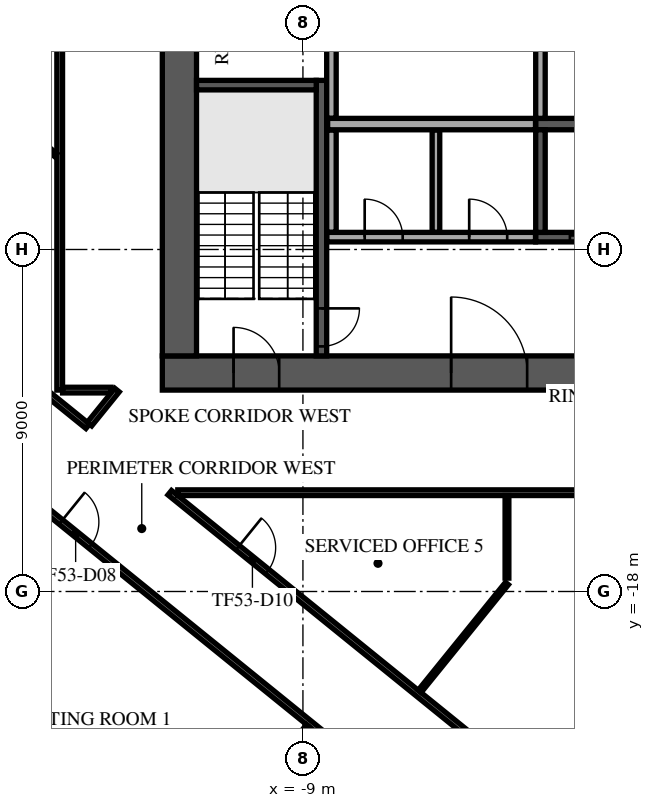
"""IFC4 building model, lengths in metres.
Left out: names, types, materials, properties, quantities, classifications, styles, units other than length and angle.
Written with IfcOpenShell. Run it as: python <this file> out.ifc"""

import sys

from ifc_helpers import new_model, si_unit, direction, frame, frame_2d, origin, place, context, subcontext, project, spatial, rectangle, extrude, element, fill, save


model = new_model("IFC4")
c1 = context("Model", 3, precision=1e-05, world=origin(), true_north=direction((0.0, 1.0)))
c2 = subcontext(c1, "Body", "Model", "MODEL_VIEW")
j1 = project(units=[si_unit("LENGTHUNIT", "METRE"), si_unit("PLANEANGLEUNIT", "RADIAN")], contexts=[c1])
p1 = place(None, origin())
s1 = spatial("IfcSite", under=j1, at=p1, CompositionType="ELEMENT")
p2 = place(p1, origin())
s2 = spatial("IfcBuilding", under=s1, at=p2, CompositionType="ELEMENT")
p3 = place(p2, frame((0.0, 0.0, 225.3)))
s3 = spatial("IfcBuildingStorey", under=s2, at=p3, CompositionType="ELEMENT", Elevation=225.3)
p4 = place(p3, frame((-12.7, -12.25, 0.0), z_axis=(0.0, 0.0, 1.0), x_axis=(1.0, 0.0, 0.0)))
e1 = element("IfcWall", 1, at=p4, inside=s3, PredefinedType="SHEAR", context=c2, shape_type="SweptSolid", body=[
    extrude(rectangle(XDim=25.4, YDim=0.9, at=frame_2d((12.7, 0.0))), origin(), (0.0, 0.0, 1.0), 3.62),
])
p5 = place(p4, frame((7.6, 0.0, 0.0)))
e2 = element("IfcOpeningElement", 2, at=p5, cuts=e1, PredefinedType="OPENING", context=c2, shape_type="SweptSolid", body=[
    extrude(rectangle(XDim=2.0, YDim=2.1, at=frame_2d((1.0, 1.05))), frame((0.0, 0.46, 0.0), z_axis=(0.0, -1.0, 0.0), x_axis=(1.0, 0.0, 0.0)), (0.0, 0.0, 1.0), 0.92),
])
p6 = place(p4, frame((17.725, 0.0, 0.0)))
e3 = element("IfcOpeningElement", 3, at=p6, cuts=e1, PredefinedType="OPENING", context=c2, shape_type="SweptSolid", body=[
    extrude(rectangle(XDim=1.2, YDim=2.1, at=frame_2d((0.6, 1.05))), frame((0.0, 0.46, 0.0), z_axis=(0.0, -1.0, 0.0), x_axis=(1.0, 0.0, 0.0)), (0.0, 0.0, 1.0), 0.92),
])
p7 = place(p4, frame((1.875, 0.0, 0.0)))
e4 = element("IfcOpeningElement", 4, at=p7, cuts=e1, PredefinedType="OPENING", context=c2, shape_type="SweptSolid", body=[
    extrude(rectangle(XDim=1.2, YDim=2.1, at=frame_2d((0.6, 1.05))), frame((0.0, 0.46, 0.0), z_axis=(0.0, -1.0, 0.0), x_axis=(1.0, 0.0, 0.0)), (0.0, 0.0, 1.0), 0.92),
])
p8 = place(p4, frame((22.325, 0.0, 0.0)))
e5 = element("IfcOpeningElement", 5, at=p8, cuts=e1, PredefinedType="OPENING", context=c2, shape_type="SweptSolid", body=[
    extrude(rectangle(XDim=1.2, YDim=2.1, at=frame_2d((0.6, 1.05))), frame((0.0, 0.46, 0.0), z_axis=(0.0, -1.0, 0.0), x_axis=(1.0, 0.0, 0.0)), (0.0, 0.0, 1.0), 0.92),
])
p9 = place(p3, frame((-12.25, -11.8, 0.0), z_axis=(0.0, 0.0, 1.0), x_axis=(0.0, 1.0, 0.0)))
e6 = element("IfcWall", 6, at=p9, inside=s3, PredefinedType="SHEAR", context=c2, shape_type="SweptSolid", body=[
    extrude(rectangle(XDim=23.6, YDim=0.9, at=frame_2d((11.8, 0.0))), origin(), (0.0, 0.0, 1.0), 3.62),
])
p10 = place(p9, frame((10.6, 0.0, 0.0)))
e7 = element("IfcOpeningElement", 7, at=p10, cuts=e6, PredefinedType="OPENING", context=c2, shape_type="SweptSolid", body=[
    extrude(rectangle(XDim=2.4, YDim=2.4, at=frame_2d((1.2, 1.2))), frame((0.0, 0.46, 0.0), z_axis=(0.0, -1.0, 0.0), x_axis=(1.0, 0.0, 0.0)), (0.0, 0.0, 1.0), 0.92),
])
p11 = place(p3, frame((-2.875, -5.7, 0.0), z_axis=(0.0, 0.0, 1.0), x_axis=(1.0, 0.0, 0.0)))
e8 = element("IfcWall", 8, at=p11, inside=s3, PredefinedType="SOLIDWALL", context=c2, shape_type="SweptSolid", body=[
    extrude(rectangle(XDim=11.25, YDim=0.3, at=frame_2d((5.625, 0.0))), origin(), (0.0, 0.0, 1.0), 3.62),
])
p12 = place(p3, frame((-2.75, -5.55, 0.0), z_axis=(0.0, 0.0, 1.0), x_axis=(0.0, 1.0, 0.0)))
e9 = element("IfcWall", 9, at=p12, inside=s3, PredefinedType="SOLIDWALL", context=c2, shape_type="SweptSolid", body=[
    extrude(rectangle(XDim=2.7, YDim=0.25, at=frame_2d((1.35, 0.0))), origin(), (0.0, 0.0, 1.0), 3.62),
])
p13 = place(p3, frame((-2.875, -8.675, 0.0), z_axis=(0.0, 0.0, 1.0), x_axis=(1.0, 0.0, 0.0)))
e10 = element("IfcWall", 10, at=p13, inside=s3, PredefinedType="SOLIDWALL", context=c2, shape_type="SweptSolid", body=[
    extrude(rectangle(XDim=11.25, YDim=0.25, at=frame_2d((5.625, 0.0))), origin(), (0.0, 0.0, 1.0), 3.62),
])
p14 = place(p13, frame((0.9, 0.0, 0.0)))
e11 = element("IfcOpeningElement", 11, at=p14, cuts=e10, PredefinedType="OPENING", context=c2, shape_type="SweptSolid", body=[
    extrude(rectangle(XDim=1.2, YDim=2.1, at=frame_2d((0.6, 1.05))), frame((0.0, 0.135, 0.0), z_axis=(0.0, -1.0, 0.0), x_axis=(1.0, 0.0, 0.0)), (0.0, 0.0, 1.0), 0.27),
])
p15 = place(p13, frame((3.65, 0.0, 0.0)))
e12 = element("IfcOpeningElement", 12, at=p15, cuts=e10, PredefinedType="OPENING", context=c2, shape_type="SweptSolid", body=[
    extrude(rectangle(XDim=1.2, YDim=2.1, at=frame_2d((0.6, 1.05))), frame((0.0, 0.135, 0.0), z_axis=(0.0, -1.0, 0.0), x_axis=(1.0, 0.0, 0.0)), (0.0, 0.0, 1.0), 0.27),
])
p16 = place(p13, frame((6.4, 0.0, 0.0)))
e13 = element("IfcOpeningElement", 13, at=p16, cuts=e10, PredefinedType="OPENING", context=c2, shape_type="SweptSolid", body=[
    extrude(rectangle(XDim=1.2, YDim=2.1, at=frame_2d((0.6, 1.05))), frame((0.0, 0.135, 0.0), z_axis=(0.0, -1.0, 0.0), x_axis=(1.0, 0.0, 0.0)), (0.0, 0.0, 1.0), 0.27),
])
p17 = place(p13, frame((9.15, 0.0, 0.0)))
e14 = element("IfcOpeningElement", 14, at=p17, cuts=e10, PredefinedType="OPENING", context=c2, shape_type="SweptSolid", body=[
    extrude(rectangle(XDim=1.2, YDim=2.1, at=frame_2d((0.6, 1.05))), frame((0.0, 0.135, 0.0), z_axis=(0.0, -1.0, 0.0), x_axis=(1.0, 0.0, 0.0)), (0.0, 0.0, 1.0), 0.27),
])
p18 = place(p3, frame((-2.75, -8.55, 0.0), z_axis=(0.0, 0.0, 1.0), x_axis=(0.0, 1.0, 0.0)))
e15 = element("IfcWall", 15, at=p18, inside=s3, PredefinedType="SOLIDWALL", context=c2, shape_type="SweptSolid", body=[
    extrude(rectangle(XDim=2.7, YDim=0.25, at=frame_2d((1.35, 0.0))), origin(), (0.0, 0.0, 1.0), 3.62),
])
p19 = place(p3, frame((-8.512, -4.55, 0.0), z_axis=(0.0, 0.0, 1.0), x_axis=(0.0, -1.0, 0.0)))
e16 = element("IfcWall", 16, at=p19, inside=s3, PredefinedType="SOLIDWALL", context=c2, shape_type="SweptSolid", body=[
    extrude(rectangle(XDim=7.25, YDim=0.275, at=frame_2d((3.625, 0.0))), origin(), (0.0, 0.0, 1.0), 3.62),
])
p20 = place(p19, frame((6.0, 0.0, 0.0)))
e17 = element("IfcOpeningElement", 17, at=p20, cuts=e16, PredefinedType="OPENING", context=c2, shape_type="SweptSolid", body=[
    extrude(rectangle(XDim=1.0, YDim=2.1, at=frame_2d((0.5, 1.05))), frame((0.0, 0.147, 0.0), z_axis=(0.0, -1.0, 0.0), x_axis=(1.0, 0.0, 0.0)), (0.0, 0.0, 1.0), 0.295),
])
p21 = place(p3, frame((-8.65, -4.675, 0.0), z_axis=(0.0, 0.0, 1.0), x_axis=(-1.0, 0.0, 0.0)))
e18 = element("IfcWall", 18, at=p21, inside=s3, PredefinedType="SOLIDWALL", context=c2, shape_type="SweptSolid", body=[
    extrude(rectangle(XDim=3.15, YDim=0.25, at=frame_2d((1.575, 0.0))), origin(), (0.0, 0.0, 1.0), 3.62),
])
p22 = place(p3, frame((-8.37, -8.675, 0.0), z_axis=(0.0, 0.0, 1.0), x_axis=(1.0, 0.0, 0.0)))
e19 = element("IfcWall", 19, at=p22, inside=s3, PredefinedType="PARTITIONING", context=c2, shape_type="SweptSolid", body=[
    extrude(rectangle(XDim=5.49, YDim=0.25, at=frame_2d((2.745, 0.0))), origin(), (0.0, 0.0, 1.0), 3.62),
])
p23 = place(p22, frame((0.995, 0.0, 0.0)))
e20 = element("IfcOpeningElement", 20, at=p23, cuts=e19, PredefinedType="OPENING", context=c2, shape_type="SweptSolid", body=[
    extrude(rectangle(XDim=1.0, YDim=2.1, at=frame_2d((0.5, 1.05))), frame((0.0, 0.135, 0.0), z_axis=(0.0, -1.0, 0.0), x_axis=(1.0, 0.0, 0.0)), (0.0, 0.0, 1.0), 0.27),
])
p24 = place(p22, frame((3.745, 0.0, 0.0)))
e21 = element("IfcOpeningElement", 21, at=p24, cuts=e19, PredefinedType="OPENING", context=c2, shape_type="SweptSolid", body=[
    extrude(rectangle(XDim=1.0, YDim=2.1, at=frame_2d((0.5, 1.05))), frame((0.0, 0.135, 0.0), z_axis=(0.0, -1.0, 0.0), x_axis=(1.0, 0.0, 0.0)), (0.0, 0.0, 1.0), 0.27),
])
p25 = place(p3, frame((-8.25, -8.545, 0.0), z_axis=(0.0, 0.0, 1.0), x_axis=(0.0, 1.0, 0.0)))
e22 = element("IfcWall", 22, at=p25, inside=s3, PredefinedType="PARTITIONING", context=c2, shape_type="SweptSolid", body=[
    extrude(rectangle(XDim=2.69, YDim=0.25, at=frame_2d((1.345, 0.0))), origin(), (0.0, 0.0, 1.0), 3.62),
])
p26 = place(p3, frame((-5.5, -8.545, 0.0), z_axis=(0.0, 0.0, 1.0), x_axis=(0.0, 1.0, 0.0)))
e23 = element("IfcWall", 23, at=p26, inside=s3, PredefinedType="PARTITIONING", context=c2, shape_type="SweptSolid", body=[
    extrude(rectangle(XDim=2.69, YDim=0.2, at=frame_2d((1.345, 0.0))), origin(), (0.0, 0.0, 1.0), 3.62),
])
p27 = place(p3, frame((-8.35, -5.7, 0.0), z_axis=(0.0, 0.0, 1.0), x_axis=(1.0, 0.0, 0.0)))
e24 = element("IfcWall", 24, at=p27, inside=s3, PredefinedType="PARTITIONING", context=c2, shape_type="SweptSolid", body=[
    extrude(rectangle(XDim=5.47, YDim=0.3, at=frame_2d((2.735, 0.0))), origin(), (0.0, 0.0, 1.0), 3.62),
])
p28 = place(p3, frame((-8.25, -5.545, 0.0), z_axis=(0.0, 0.0, 1.0), x_axis=(0.0, 1.0, 0.0)))
e25 = element("IfcWall", 25, at=p28, inside=s3, PredefinedType="PARTITIONING", context=c2, shape_type="SweptSolid", body=[
    extrude(rectangle(XDim=2.69, YDim=0.25, at=frame_2d((1.345, 0.0))), origin(), (0.0, 0.0, 1.0), 3.62),
])
p29 = place(p3, frame((-33.845, -10.81, 0.0), z_axis=(0.0, 0.0, 1.0), x_axis=(0.777145437972, -0.629321037499, 0.0)))
e26 = element("IfcWall", 26, at=p29, inside=s3, PredefinedType="STANDARD", context=c2, shape_type="SweptSolid", body=[
    extrude(rectangle(XDim=39.0, YDim=0.6, at=frame_2d((19.5, 0.0))), origin(), (0.0, 0.0, 1.0), 3.62),
])
p30 = place(p29, frame((1.217, 0.0, 0.9)))
e27 = element("IfcOpeningElement", 27, at=p30, cuts=e26, PredefinedType="OPENING", context=c2, shape_type="SweptSolid", body=[
    extrude(rectangle(XDim=1.9, YDim=2.1, at=frame_2d((0.95, 1.05))), frame((0.0, 0.31, 0.0), z_axis=(0.0, -1.0, 0.0), x_axis=(1.0, 0.0, 0.0)), (0.0, 0.0, 1.0), 0.62),
])
p31 = place(p29, frame((5.55, 0.0, 0.9)))
e28 = element("IfcOpeningElement", 28, at=p31, cuts=e26, PredefinedType="OPENING", context=c2, shape_type="SweptSolid", body=[
    extrude(rectangle(XDim=1.9, YDim=2.1, at=frame_2d((0.95, 1.05))), frame((0.0, 0.31, 0.0), z_axis=(0.0, -1.0, 0.0), x_axis=(1.0, 0.0, 0.0)), (0.0, 0.0, 1.0), 0.62),
])
p32 = place(p29, frame((9.883, 0.0, 0.9)))
e29 = element("IfcOpeningElement", 29, at=p32, cuts=e26, PredefinedType="OPENING", context=c2, shape_type="SweptSolid", body=[
    extrude(rectangle(XDim=1.9, YDim=2.1, at=frame_2d((0.95, 1.05))), frame((0.0, 0.31, 0.0), z_axis=(0.0, -1.0, 0.0), x_axis=(1.0, 0.0, 0.0)), (0.0, 0.0, 1.0), 0.62),
])
p33 = place(p29, frame((14.217, 0.0, 0.9)))
e30 = element("IfcOpeningElement", 30, at=p33, cuts=e26, PredefinedType="OPENING", context=c2, shape_type="SweptSolid", body=[
    extrude(rectangle(XDim=1.9, YDim=2.1, at=frame_2d((0.95, 1.05))), frame((0.0, 0.31, 0.0), z_axis=(0.0, -1.0, 0.0), x_axis=(1.0, 0.0, 0.0)), (0.0, 0.0, 1.0), 0.62),
])
p34 = place(p29, frame((18.55, 0.0, 0.9)))
e31 = element("IfcOpeningElement", 31, at=p34, cuts=e26, PredefinedType="OPENING", context=c2, shape_type="SweptSolid", body=[
    extrude(rectangle(XDim=1.9, YDim=2.1, at=frame_2d((0.95, 1.05))), frame((0.0, 0.31, 0.0), z_axis=(0.0, -1.0, 0.0), x_axis=(1.0, 0.0, 0.0)), (0.0, 0.0, 1.0), 0.62),
])
p35 = place(p29, frame((22.883, 0.0, 0.9)))
e32 = element("IfcOpeningElement", 32, at=p35, cuts=e26, PredefinedType="OPENING", context=c2, shape_type="SweptSolid", body=[
    extrude(rectangle(XDim=1.9, YDim=2.1, at=frame_2d((0.95, 1.05))), frame((0.0, 0.31, 0.0), z_axis=(0.0, -1.0, 0.0), x_axis=(1.0, 0.0, 0.0)), (0.0, 0.0, 1.0), 0.62),
])
p36 = place(p29, frame((27.217, 0.0, 0.9)))
e33 = element("IfcOpeningElement", 33, at=p36, cuts=e26, PredefinedType="OPENING", context=c2, shape_type="SweptSolid", body=[
    extrude(rectangle(XDim=1.9, YDim=2.1, at=frame_2d((0.95, 1.05))), frame((0.0, 0.31, 0.0), z_axis=(0.0, -1.0, 0.0), x_axis=(1.0, 0.0, 0.0)), (0.0, 0.0, 1.0), 0.62),
])
p37 = place(p29, frame((31.55, 0.0, 0.9)))
e34 = element("IfcOpeningElement", 34, at=p37, cuts=e26, PredefinedType="OPENING", context=c2, shape_type="SweptSolid", body=[
    extrude(rectangle(XDim=1.9, YDim=2.1, at=frame_2d((0.95, 1.05))), frame((0.0, 0.31, 0.0), z_axis=(0.0, -1.0, 0.0), x_axis=(1.0, 0.0, 0.0)), (0.0, 0.0, 1.0), 0.62),
])
p38 = place(p29, frame((35.883, 0.0, 0.9)))
e35 = element("IfcOpeningElement", 35, at=p38, cuts=e26, PredefinedType="OPENING", context=c2, shape_type="SweptSolid", body=[
    extrude(rectangle(XDim=1.9, YDim=2.1, at=frame_2d((0.95, 1.05))), frame((0.0, 0.31, 0.0), z_axis=(0.0, -1.0, 0.0), x_axis=(1.0, 0.0, 0.0)), (0.0, 0.0, 1.0), 0.62),
])
p39 = place(p3, frame((-24.857, -3.939, 0.0), z_axis=(0.0, 0.0, 1.0), x_axis=(0.629334227899, 0.777134756393, 0.0)))
e36 = element("IfcWall", 36, at=p39, inside=s3, PredefinedType="PARTITIONING", context=c2, shape_type="SweptSolid", body=[
    extrude(rectangle(XDim=15.027, YDim=0.15, at=frame_2d((7.513, 0.0))), origin(), (0.0, 0.0, 1.0), 3.17),
])
p40 = place(p3, frame((-24.374, -8.878, 0.0), z_axis=(0.0, 0.0, 1.0), x_axis=(0.777132572121, -0.629336925143, 0.0)))
e37 = element("IfcWall", 37, at=p40, inside=s3, PredefinedType="PARTITIONING", context=c2, shape_type="SweptSolid", body=[
    extrude(rectangle(XDim=26.785, YDim=0.15, at=frame_2d((13.393, 0.0))), origin(), (0.0, 0.0, 1.0), 3.17),
])
p41 = place(p40, frame((1.3, 0.0, 0.0)))
e38 = element("IfcOpeningElement", 38, at=p41, cuts=e37, PredefinedType="OPENING", context=c2, shape_type="SweptSolid", body=[
    extrude(rectangle(XDim=1.0, YDim=2.1, at=frame_2d((0.5, 1.05))), frame((0.0, 0.085, 0.0), z_axis=(0.0, -1.0, 0.0), x_axis=(1.0, 0.0, 0.0)), (0.0, 0.0, 1.0), 0.17),
])
p42 = place(p40, frame((5.461, 0.0, 0.0)))
e39 = element("IfcOpeningElement", 39, at=p42, cuts=e37, PredefinedType="OPENING", context=c2, shape_type="SweptSolid", body=[
    extrude(rectangle(XDim=1.0, YDim=2.1, at=frame_2d((0.5, 1.05))), frame((0.0, 0.085, 0.0), z_axis=(0.0, -1.0, 0.0), x_axis=(1.0, 0.0, 0.0)), (0.0, 0.0, 1.0), 0.17),
])
p43 = place(p40, frame((11.587, 0.0, 0.0)))
e40 = element("IfcOpeningElement", 40, at=p43, cuts=e37, PredefinedType="OPENING", context=c2, shape_type="SweptSolid", body=[
    extrude(rectangle(XDim=1.0, YDim=2.1, at=frame_2d((0.5, 1.05))), frame((0.0, 0.085, 0.0), z_axis=(0.0, -1.0, 0.0), x_axis=(1.0, 0.0, 0.0)), (0.0, 0.0, 1.0), 0.17),
])
p44 = place(p3, frame((-22.922, -6.965, 0.0), z_axis=(0.0, 0.0, 1.0), x_axis=(0.777148029431, -0.629317837306, 0.0)))
e41 = element("IfcWall", 41, at=p44, inside=s3, PredefinedType="PARTITIONING", context=c2, shape_type="SweptSolid", body=[
    extrude(rectangle(XDim=10.627, YDim=0.15, at=frame_2d((5.314, 0.0))), origin(), (0.0, 0.0, 1.0), 3.17),
])
p45 = place(p3, frame((-15.4, -12.7, 0.0), z_axis=(0.0, 0.0, 1.0), x_axis=(0.0, 1.0, 0.0)))
e42 = element("IfcWall", 42, at=p45, inside=s3, PredefinedType="PARTITIONING", context=c2, shape_type="SweptSolid", body=[
    extrude(rectangle(XDim=20.227, YDim=0.15, at=frame_2d((10.114, 0.0))), origin(), (0.0, 0.0, 1.0), 3.17),
])
p46 = place(p45, frame((10.4, 0.0, 0.0)))
e43 = element("IfcOpeningElement", 43, at=p46, cuts=e42, PredefinedType="OPENING", context=c2, shape_type="SweptSolid", body=[
    extrude(rectangle(XDim=1.0, YDim=2.1, at=frame_2d((0.5, 1.05))), frame((0.0, 0.085, 0.0), z_axis=(0.0, -1.0, 0.0), x_axis=(1.0, 0.0, 0.0)), (0.0, 0.0, 1.0), 0.17),
])
p47 = place(p45, frame((15.784, 0.0, 0.0)))
e44 = element("IfcOpeningElement", 44, at=p47, cuts=e42, PredefinedType="OPENING", context=c2, shape_type="SweptSolid", body=[
    extrude(rectangle(XDim=1.0, YDim=2.1, at=frame_2d((0.5, 1.05))), frame((0.0, 0.085, 0.0), z_axis=(0.0, -1.0, 0.0), x_axis=(1.0, 0.0, 0.0)), (0.0, 0.0, 1.0), 0.17),
])
p48 = place(p3, frame((-15.325, -12.7, 0.0), z_axis=(0.0, 0.0, 1.0), x_axis=(1.0, 0.0, 0.0)))
e45 = element("IfcWall", 45, at=p48, inside=s3, PredefinedType="PARTITIONING", context=c2, shape_type="SweptSolid", body=[
    extrude(rectangle(XDim=1.277, YDim=0.15, at=frame_2d((0.638, 0.0))), origin(), (0.0, 0.0, 1.0), 3.17),
])
p49 = place(p3, frame((-14.616, -13.595, 0.0), z_axis=(0.0, 0.0, 1.0), x_axis=(0.629338514223, 0.777131285251, 0.0)))
e46 = element("IfcWall", 46, at=p49, inside=s3, PredefinedType="PARTITIONING", context=c2, shape_type="SweptSolid", body=[
    extrude(rectangle(XDim=1.151, YDim=0.15, at=frame_2d((0.576, 0.0))), origin(), (0.0, 0.0, 1.0), 3.17),
])
p50 = place(p3, frame((-12.505, -15.4, 0.0), z_axis=(0.0, 0.0, 1.0), x_axis=(0.77712909422, -0.629341219783, 0.0)))
e47 = element("IfcWall", 47, at=p50, inside=s3, PredefinedType="PARTITIONING", context=c2, shape_type="SweptSolid", body=[
    extrude(rectangle(XDim=13.457, YDim=0.15, at=frame_2d((6.729, 0.0))), origin(), (0.0, 0.0, 1.0), 3.17),
])
p51 = place(p50, frame((2.3, 0.0, 0.0)))
e48 = element("IfcOpeningElement", 48, at=p51, cuts=e47, PredefinedType="OPENING", context=c2, shape_type="SweptSolid", body=[
    extrude(rectangle(XDim=1.0, YDim=2.1, at=frame_2d((0.5, 1.05))), frame((0.0, 0.085, 0.0), z_axis=(0.0, -1.0, 0.0), x_axis=(1.0, 0.0, 0.0)), (0.0, 0.0, 1.0), 0.17),
])
p52 = place(p3, frame((-12.293, -15.4, 0.0), z_axis=(0.0, 0.0, 1.0), x_axis=(1.0, 0.0, 0.0)))
e49 = element("IfcWall", 49, at=p52, inside=s3, PredefinedType="PARTITIONING", context=c2, shape_type="SweptSolid", body=[
    extrude(rectangle(XDim=21.489, YDim=0.15, at=frame_2d((10.745, 0.0))), origin(), (0.0, 0.0, 1.0), 3.17),
])
p53 = place(p52, frame((13.212, 0.0, 0.0)))
e50 = element("IfcOpeningElement", 50, at=p53, cuts=e49, PredefinedType="OPENING", context=c2, shape_type="SweptSolid", body=[
    extrude(rectangle(XDim=1.8, YDim=2.1, at=frame_2d((0.9, 1.05))), frame((0.0, 0.085, 0.0), z_axis=(0.0, -1.0, 0.0), x_axis=(1.0, 0.0, 0.0)), (0.0, 0.0, 1.0), 0.17),
])
p54 = place(p3, frame((-22.355, -0.968, 0.0), z_axis=(0.0, 0.0, 1.0), x_axis=(0.777138402267, -0.629329725757, 0.0)))
e51 = element("IfcWall", 51, at=p54, inside=s3, PredefinedType="PARTITIONING", context=c2, shape_type="SweptSolid", body=[
    extrude(rectangle(XDim=8.812, YDim=0.1, at=frame_2d((4.406, 0.0))), origin(), (0.0, 0.0, 1.0), 3.17),
])
p55 = place(p3, frame((-13.439, -26.945, 0.0), z_axis=(0.0, 0.0, 1.0), x_axis=(0.645645597662, 0.763637192795, 0.0)))
e52 = element("IfcWall", 52, at=p55, inside=s3, PredefinedType="PARTITIONING", context=c2, shape_type="SweptSolid", body=[
    extrude(rectangle(XDim=7.085, YDim=0.1, at=frame_2d((3.542, 0.0))), origin(), (0.0, 0.0, 1.0), 2.97),
])
p56 = place(p3, frame((-5.93, -20.629, 0.0), z_axis=(0.0, 0.0, 1.0), x_axis=(0.629175159383, 0.777263545277, 0.0)))
e53 = element("IfcWall", 53, at=p56, inside=s3, PredefinedType="PARTITIONING", context=c2, shape_type="SweptSolid", body=[
    extrude(rectangle(XDim=3.653, YDim=0.1, at=frame_2d((1.827, 0.0))), origin(), (0.0, 0.0, 1.0), 3.17),
])
p57 = place(p3, frame((-3.631, -17.648, 0.0), z_axis=(0.0, 0.0, 1.0), x_axis=(0.0, 1.0, 0.0)))
e54 = element("IfcWall", 54, at=p57, inside=s3, PredefinedType="PARTITIONING", context=c2, shape_type="SweptSolid", body=[
    extrude(rectangle(XDim=2.173, YDim=0.1, at=frame_2d((1.086, 0.0))), origin(), (0.0, 0.0, 1.0), 3.62),
])
p58 = place(p5, origin())
e55 = element("IfcDoor", 55, at=p58, inside=s3, OperationType="SINGLE_SWING_LEFT", PredefinedType="DOOR", context=c2, shape_type="SweptSolid", body=[
    extrude(rectangle(XDim=2.0, YDim=2.1, at=frame_2d((1.0, 1.05))), frame((0.0, 0.025, 0.0), z_axis=(0.0, -1.0, 0.0), x_axis=(1.0, 0.0, 0.0)), (0.0, 0.0, 1.0), 0.05),
])
fill(e2, e55)
p59 = place(p7, origin())
e56 = element("IfcDoor", 56, at=p59, inside=s3, OperationType="SINGLE_SWING_LEFT", PredefinedType="DOOR", context=c2, shape_type="SweptSolid", body=[
    extrude(rectangle(XDim=1.2, YDim=2.1, at=frame_2d((0.6, 1.05))), frame((0.0, 0.025, 0.0), z_axis=(0.0, -1.0, 0.0), x_axis=(1.0, 0.0, 0.0)), (0.0, 0.0, 1.0), 0.05),
])
fill(e4, e56)
p60 = place(p14, origin())
e57 = element("IfcDoor", 57, at=p60, inside=s3, OperationType="DOUBLE_DOOR_SLIDING", PredefinedType="DOOR", context=c2, shape_type="SweptSolid", body=[
    extrude(rectangle(XDim=1.2, YDim=2.1, at=frame_2d((0.6, 1.05))), frame((0.0, 0.025, 0.0), z_axis=(0.0, -1.0, 0.0), x_axis=(1.0, 0.0, 0.0)), (0.0, 0.0, 1.0), 0.05),
])
fill(e11, e57)
p61 = place(p20, origin())
e58 = element("IfcDoor", 58, at=p61, inside=s3, OperationType="SINGLE_SWING_LEFT", PredefinedType="DOOR", context=c2, shape_type="SweptSolid", body=[
    extrude(rectangle(XDim=1.0, YDim=2.1, at=frame_2d((0.5, 1.05))), frame((0.0, 0.025, 0.0), z_axis=(0.0, -1.0, 0.0), x_axis=(1.0, 0.0, 0.0)), (0.0, 0.0, 1.0), 0.05),
])
fill(e17, e58)
p62 = place(p23, origin())
e59 = element("IfcDoor", 59, at=p62, inside=s3, OperationType="SINGLE_SWING_RIGHT", PredefinedType="DOOR", context=c2, shape_type="SweptSolid", body=[
    extrude(rectangle(XDim=1.0, YDim=2.1, at=frame_2d((0.5, 1.05))), frame((0.0, 0.025, 0.0), z_axis=(0.0, -1.0, 0.0), x_axis=(1.0, 0.0, 0.0)), (0.0, 0.0, 1.0), 0.05),
])
fill(e20, e59)
p63 = place(p24, origin())
e60 = element("IfcDoor", 60, at=p63, inside=s3, OperationType="SINGLE_SWING_RIGHT", PredefinedType="DOOR", context=c2, shape_type="SweptSolid", body=[
    extrude(rectangle(XDim=1.0, YDim=2.1, at=frame_2d((0.5, 1.05))), frame((0.0, 0.025, 0.0), z_axis=(0.0, -1.0, 0.0), x_axis=(1.0, 0.0, 0.0)), (0.0, 0.0, 1.0), 0.05),
])
fill(e21, e60)
p64 = place(p43, frame((1.0, 0.0, 0.0), z_axis=(0.0, 0.0, 1.0), x_axis=(-1.0, 0.0, 0.0)))
e61 = element("IfcDoor", 61, at=p64, inside=s3, OperationType="SINGLE_SWING_RIGHT", PredefinedType="DOOR", context=c2, shape_type="SweptSolid", body=[
    extrude(rectangle(XDim=1.0, YDim=2.1, at=frame_2d((0.5, 1.05))), frame((0.0, 0.025, 0.0), z_axis=(0.0, -1.0, 0.0), x_axis=(1.0, 0.0, 0.0)), (0.0, 0.0, 1.0), 0.05),
])
fill(e40, e61)
p65 = place(p51, origin())
e62 = element("IfcDoor", 62, at=p65, inside=s3, OperationType="SINGLE_SWING_RIGHT", PredefinedType="DOOR", context=c2, shape_type="SweptSolid", body=[
    extrude(rectangle(XDim=1.0, YDim=2.1, at=frame_2d((0.5, 1.05))), frame((0.0, 0.025, 0.0), z_axis=(0.0, -1.0, 0.0), x_axis=(1.0, 0.0, 0.0)), (0.0, 0.0, 1.0), 0.05),
])
fill(e48, e62)
save(model, sys.argv[1])
